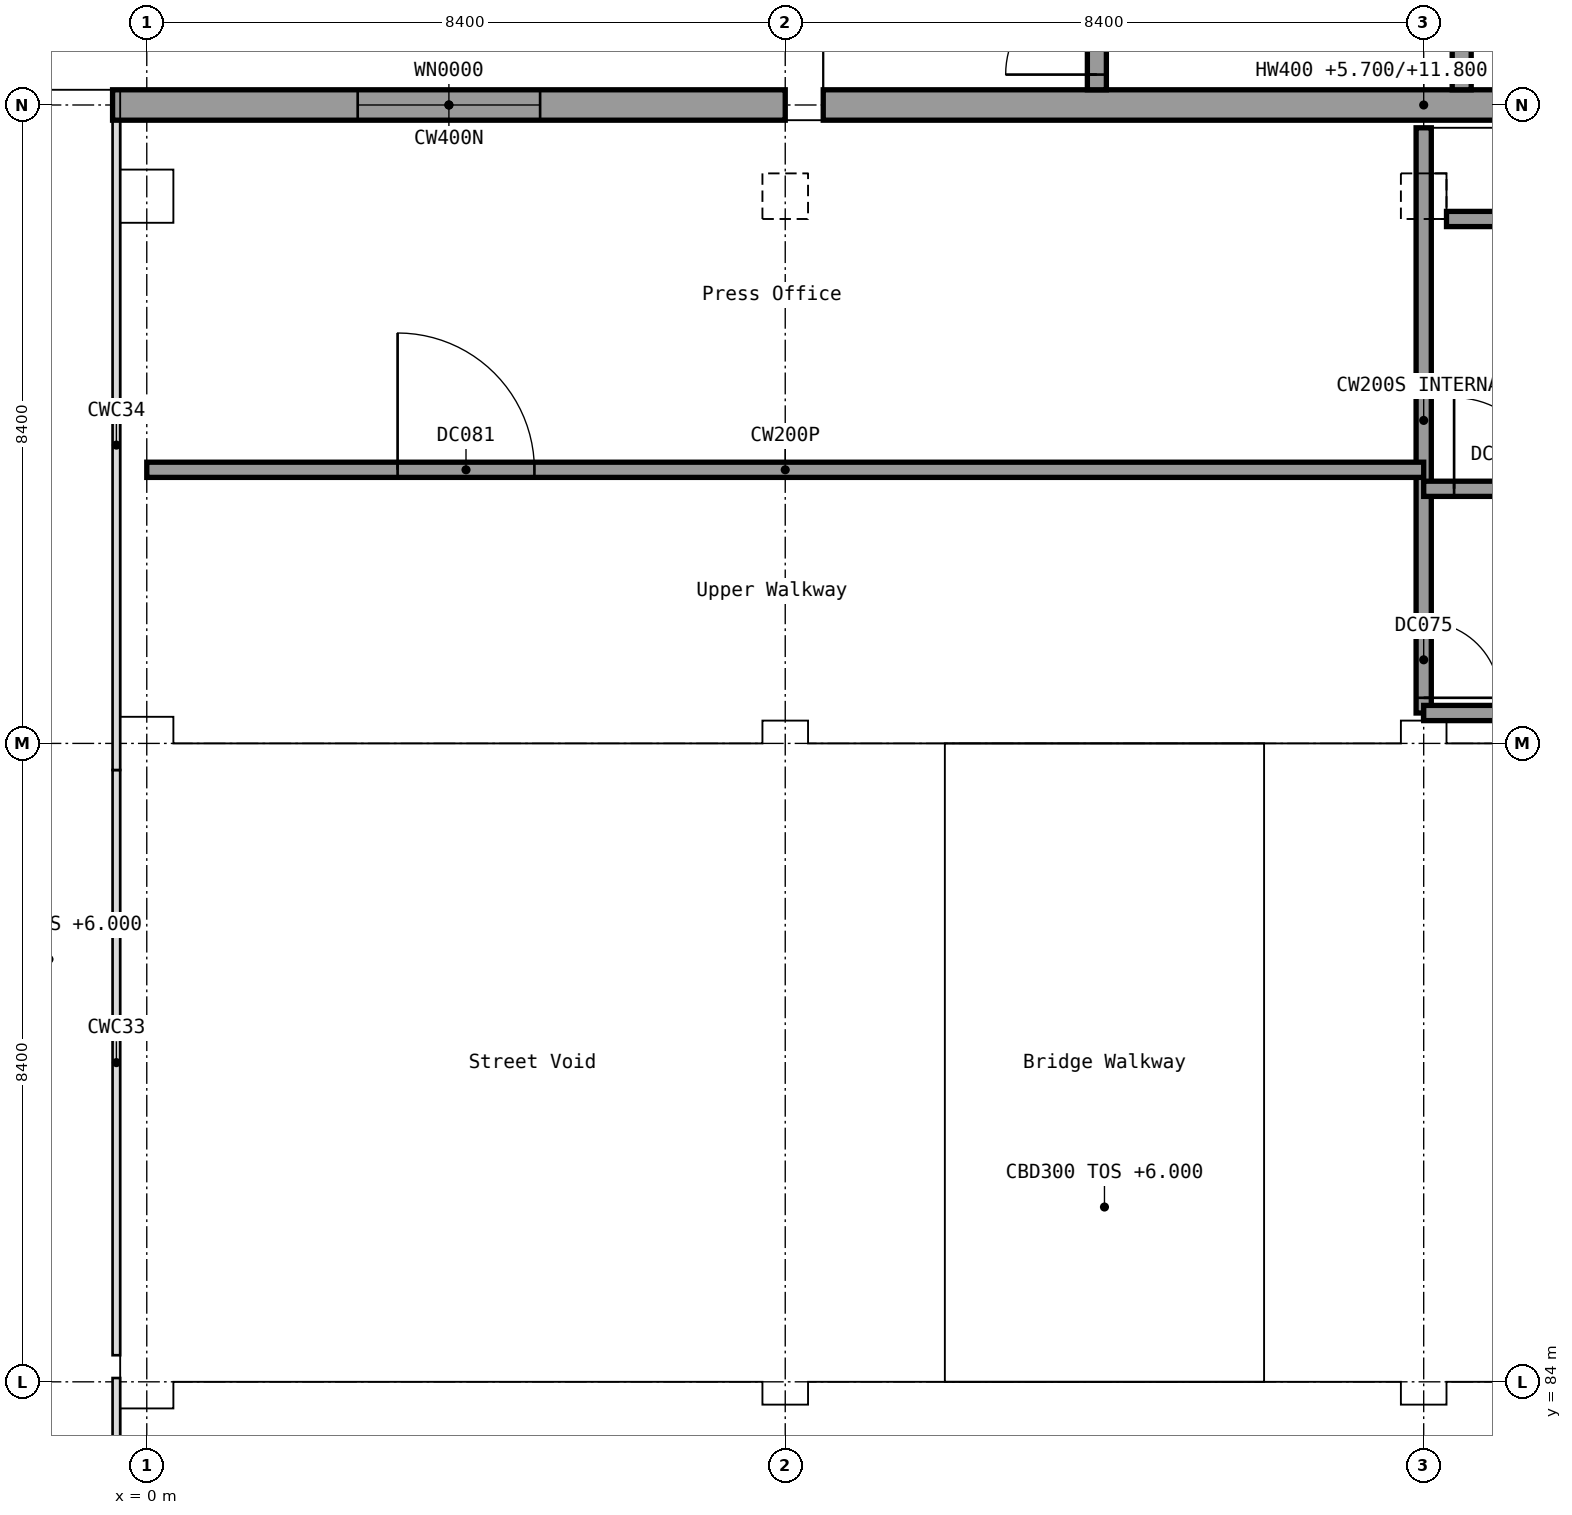
"""IFC4 building model, lengths in metres.
Left out: names, types, materials, properties, quantities, classifications, styles, units other than length and angle.
Written with IfcOpenShell. Run it as: python <this file> out.ifc"""

import sys

from ifc_helpers import new_model, si_unit, direction, frame, frame_2d, origin, origin_2d, place, context, subcontext, project, spatial, rectangle, extrude, element, fill, save


model = new_model("IFC4")
c1 = context("Model", 3, precision=1e-05, world=origin(), true_north=direction((0.0, 1.0)))
c2 = subcontext(c1, "Body", "Model", "MODEL_VIEW")
j1 = project(units=[si_unit("LENGTHUNIT", "METRE"), si_unit("PLANEANGLEUNIT", "RADIAN")], contexts=[c1])
p1 = place(None, origin())
s1 = spatial("IfcSite", under=j1, at=p1, CompositionType="ELEMENT")
p2 = place(p1, origin())
s2 = spatial("IfcBuilding", under=s1, at=p2, CompositionType="ELEMENT")
p3 = place(p2, frame((0.0, 0.0, 6.0)))
s3 = spatial("IfcBuildingStorey", under=s2, at=p3, CompositionType="ELEMENT", Elevation=6.0)
p4 = place(p3, frame((8.4, 100.8, 0.0), z_axis=(0.0, 0.0, 1.0), x_axis=(1.0, 0.0, 0.0)))
e1 = element("IfcColumn", 1, at=p4, inside=s3, PredefinedType="COLUMN", context=c2, shape_type="SweptSolid", body=[
    extrude(rectangle(XDim=1.0, YDim=1.6, at=origin_2d()), origin(), (0.0, 0.0, 1.0), 4.5),
])
p5 = place(p3, frame((8.9, 100.8, -0.3), z_axis=(0.0, 0.0, 1.0), x_axis=(1.0, 0.0, 0.0)))
e2 = element("IfcWall", 2, at=p5, inside=s3, PredefinedType="STANDARD", context=c2, shape_type="SweptSolid", body=[
    extrude(rectangle(XDim=15.8, YDim=0.4, at=frame_2d((7.9, 0.0))), origin(), (0.0, 0.0, 1.0), 6.1),
])
p6 = place(p3, frame((12.5, 101.0, 0.0), z_axis=(0.0, 0.0, 1.0), x_axis=(0.0, 1.0, 0.0)))
e3 = element("IfcWall", 3, at=p6, inside=s3, PredefinedType="SHEAR", context=c2, shape_type="SweptSolid", body=[
    extrude(rectangle(XDim=8.2, YDim=0.25, at=frame_2d((4.1, 0.0))), origin(), (0.0, 0.0, 1.0), 4.1),
])
p7 = place(p6, frame((0.2, 0.0, 0.0)))
e4 = element("IfcOpeningElement", 4, at=p7, cuts=e3, PredefinedType="OPENING", context=c2, shape_type="SweptSolid", body=[
    extrude(rectangle(XDim=1.2, YDim=2.1, at=frame_2d((0.6, 1.05))), frame((0.0, 0.125, 0.0), z_axis=(0.0, -1.0, 0.0), x_axis=(1.0, 0.0, 0.0)), (0.0, 0.0, 1.0), 0.25),
])
p8 = place(p3, frame((17.3, 101.0, 0.0), z_axis=(0.0, 0.0, 1.0), x_axis=(0.0, 1.0, 0.0)))
e5 = element("IfcWall", 5, at=p8, inside=s3, PredefinedType="SHEAR", context=c2, shape_type="SweptSolid", body=[
    extrude(rectangle(XDim=8.2, YDim=0.25, at=frame_2d((4.1, 0.0))), origin(), (0.0, 0.0, 1.0), 4.1),
])
p9 = place(p8, frame((2.0, 0.0, 0.0)))
e6 = element("IfcOpeningElement", 6, at=p9, cuts=e5, PredefinedType="OPENING", context=c2, shape_type="SweptSolid", body=[
    extrude(rectangle(XDim=1.2, YDim=2.1, at=frame_2d((0.6, 1.05))), frame((0.0, 0.125, 0.0), z_axis=(0.0, -1.0, 0.0), x_axis=(1.0, 0.0, 0.0)), (0.0, 0.0, 1.0), 0.25),
])
p10 = place(p3, frame((0.0, 99.6, 0.0), z_axis=(0.0, 0.0, 1.0), x_axis=(1.0, 0.0, 0.0)))
e7 = element("IfcColumn", 7, at=p10, inside=s3, PredefinedType="COLUMN", context=c2, shape_type="SweptSolid", body=[
    extrude(rectangle(XDim=0.7, YDim=0.7, at=origin_2d()), origin(), (0.0, 0.0, 1.0), 4.5),
])
for number, where, z_axis, x_axis in (
    (8, (8.4, 99.6, 0.0), (0.0, 0.0, 1.0), (1.0, 0.0, 0.0)),
    (9, (16.8, 99.6, 0.0), (0.0, 0.0, 1.0), (1.0, 0.0, 0.0)),
):
    element("IfcColumn", number, at=place(p3, frame(where, z_axis=z_axis, x_axis=x_axis)), inside=s3, PredefinedType="COLUMN", context=c2, shape_type="SweptSolid", body=[
        extrude(rectangle(XDim=0.6, YDim=0.6, at=origin_2d()), origin(), (0.0, 0.0, 1.0), 4.5),
    ])
p11 = place(p3, frame((-0.45, 100.8, 0.0), z_axis=(0.0, 0.0, 1.0), x_axis=(1.0, 0.0, 0.0)))
e10 = element("IfcWall", 10, at=p11, inside=s3, PredefinedType="SOLIDWALL", context=c2, shape_type="SweptSolid", body=[
    extrude(rectangle(XDim=8.85, YDim=0.4, at=frame_2d((4.425, 0.0))), origin(), (0.0, 0.0, 1.0), 4.5),
])
p12 = place(p11, frame((3.225, 0.0, 1.0)))
e11 = element("IfcOpeningElement", 11, at=p12, cuts=e10, PredefinedType="OPENING", context=c2, shape_type="SweptSolid", body=[
    extrude(rectangle(XDim=2.4, YDim=2.4, at=frame_2d((1.2, 1.2))), frame((0.0, 0.2, 0.0), z_axis=(0.0, -1.0, 0.0), x_axis=(1.0, 0.0, 0.0)), (0.0, 0.0, 1.0), 0.4),
])
p13 = place(p3, frame((16.8, 100.5, 0.0), z_axis=(0.0, 0.0, 1.0), x_axis=(0.0, -1.0, 0.0)))
e12 = element("IfcWall", 12, at=p13, inside=s3, PredefinedType="SOLIDWALL", context=c2, shape_type="SweptSolid", body=[
    extrude(rectangle(XDim=7.7, YDim=0.2, at=frame_2d((3.85, 0.0))), origin(), (0.0, 0.0, 1.0), 4.2),
])
p14 = place(p13, frame((6.5, 0.0, 0.0)))
e13 = element("IfcOpeningElement", 13, at=p14, cuts=e12, PredefinedType="OPENING", context=c2, shape_type="SweptSolid", body=[
    extrude(rectangle(XDim=1.0, YDim=2.4, at=frame_2d((0.5, 1.2))), frame((0.0, 0.1, 0.0), z_axis=(0.0, -1.0, 0.0), x_axis=(1.0, 0.0, 0.0)), (0.0, 0.0, 1.0), 0.2),
])
p15 = place(p3, frame((0.0, 96.0, 0.0), z_axis=(0.0, 0.0, 1.0), x_axis=(1.0, 0.0, 0.0)))
e14 = element("IfcWall", 14, at=p15, inside=s3, PredefinedType="PARTITIONING", context=c2, shape_type="SweptSolid", body=[
    extrude(rectangle(XDim=16.8, YDim=0.2, at=frame_2d((8.4, 0.0))), origin(), (0.0, 0.0, 1.0), 4.5),
])
p16 = place(p15, frame((3.3, 0.0, 0.0)))
e15 = element("IfcOpeningElement", 15, at=p16, cuts=e14, PredefinedType="OPENING", context=c2, shape_type="SweptSolid", body=[
    extrude(rectangle(XDim=1.8, YDim=2.4, at=frame_2d((0.9, 1.2))), frame((0.0, 0.1, 0.0), z_axis=(0.0, -1.0, 0.0), x_axis=(1.0, 0.0, 0.0)), (0.0, 0.0, 1.0), 0.2),
])
p17 = place(p3, frame((16.8, 92.8, 0.0), z_axis=(0.0, 0.0, 1.0), x_axis=(1.0, 0.0, 0.0)))
e16 = element("IfcWall", 16, at=p17, inside=s3, PredefinedType="SOLIDWALL", context=c2, shape_type="SweptSolid", body=[
    extrude(rectangle(XDim=8.4, YDim=0.2, at=frame_2d((4.2, 0.0))), origin(), (0.0, 0.0, 1.0), 4.2),
])
p18 = place(p3, frame((17.1, 99.3, 0.0), z_axis=(0.0, 0.0, 1.0), x_axis=(1.0, 0.0, 0.0)))
e17 = element("IfcWall", 17, at=p18, inside=s3, PredefinedType="SOLIDWALL", context=c2, shape_type="SweptSolid", body=[
    extrude(rectangle(XDim=7.8, YDim=0.2, at=frame_2d((3.9, 0.0))), origin(), (0.0, 0.0, 1.0), 4.2),
])
p19 = place(p3, frame((16.8, 95.75, 0.0), z_axis=(0.0, 0.0, 1.0), x_axis=(1.0, 0.0, 0.0)))
e18 = element("IfcWall", 18, at=p19, inside=s3, PredefinedType="SOLIDWALL", context=c2, shape_type="SweptSolid", body=[
    extrude(rectangle(XDim=8.4, YDim=0.2, at=frame_2d((4.2, 0.0))), origin(), (0.0, 0.0, 1.0), 4.2),
])
p20 = place(p19, frame((0.4, 0.0, 0.0)))
e19 = element("IfcOpeningElement", 19, at=p20, cuts=e18, PredefinedType="OPENING", context=c2, shape_type="SweptSolid", body=[
    extrude(rectangle(XDim=1.2, YDim=2.4, at=frame_2d((0.6, 1.2))), frame((0.0, 0.1, 0.0), z_axis=(0.0, -1.0, 0.0), x_axis=(1.0, 0.0, 0.0)), (0.0, 0.0, 1.0), 0.2),
])
p21 = place(p7, origin())
e20 = element("IfcDoor", 20, at=p21, inside=s3, OperationType="SINGLE_SWING_LEFT", PredefinedType="DOOR", context=c2, shape_type="SweptSolid", body=[
    extrude(rectangle(XDim=1.2, YDim=2.1, at=frame_2d((0.6, 1.05))), frame((0.0, 0.025, 0.0), z_axis=(0.0, -1.0, 0.0), x_axis=(1.0, 0.0, 0.0)), (0.0, 0.0, 1.0), 0.05),
])
fill(e4, e20)
p22 = place(p12, origin())
e21 = element("IfcWindow", 21, at=p22, inside=s3, PartitioningType="SINGLE_PANEL", PredefinedType="WINDOW", context=c2, shape_type="SweptSolid", body=[
    extrude(rectangle(XDim=2.4, YDim=2.4, at=frame_2d((1.2, 1.2))), frame((0.0, 0.03, 0.0), z_axis=(0.0, -1.0, 0.0), x_axis=(1.0, 0.0, 0.0)), (0.0, 0.0, 1.0), 0.06),
])
fill(e11, e21)
p23 = place(p14, origin())
e22 = element("IfcDoor", 22, at=p23, inside=s3, OperationType="SINGLE_SWING_RIGHT", PredefinedType="DOOR", context=c2, shape_type="SweptSolid", body=[
    extrude(rectangle(XDim=1.0, YDim=2.4, at=frame_2d((0.5, 1.2))), frame((0.0, 0.025, 0.0), z_axis=(0.0, -1.0, 0.0), x_axis=(1.0, 0.0, 0.0)), (0.0, 0.0, 1.0), 0.05),
])
fill(e13, e22)
p24 = place(p16, origin())
e23 = element("IfcDoor", 23, at=p24, inside=s3, OperationType="DOUBLE_DOOR_DOUBLE_SWING", PredefinedType="DOOR", context=c2, shape_type="SweptSolid", body=[
    extrude(rectangle(XDim=1.8, YDim=2.4, at=frame_2d((0.9, 1.2))), frame((0.0, 0.025, 0.0), z_axis=(0.0, -1.0, 0.0), x_axis=(1.0, 0.0, 0.0)), (0.0, 0.0, 1.0), 0.05),
])
fill(e15, e23)
p25 = place(p20, origin())
e24 = element("IfcDoor", 24, at=p25, inside=s3, OperationType="SINGLE_SWING_LEFT", PredefinedType="DOOR", context=c2, shape_type="SweptSolid", body=[
    extrude(rectangle(XDim=1.2, YDim=2.4, at=frame_2d((0.6, 1.2))), frame((0.0, 0.025, 0.0), z_axis=(0.0, -1.0, 0.0), x_axis=(1.0, 0.0, 0.0)), (0.0, 0.0, 1.0), 0.05),
])
fill(e19, e24)
save(model, sys.argv[1])
